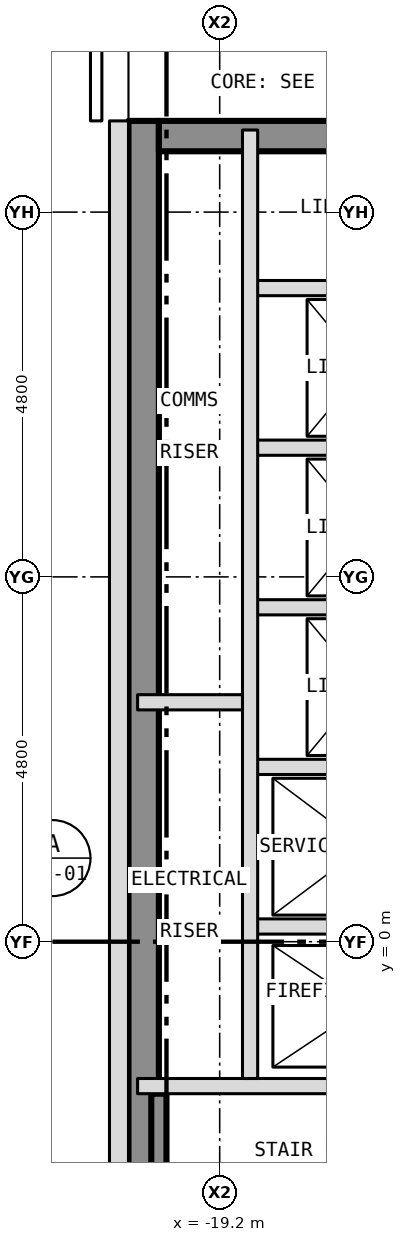
"""IFC4 building model, lengths in metres.
Left out: names, types, materials, properties, quantities, classifications, styles, units other than length and angle.
Written with IfcOpenShell. Run it as: python <this file> out.ifc"""

import sys

from ifc_helpers import new_model, si_unit, direction, frame, frame_2d, origin, place, context, subcontext, project, spatial, rectangle, extrude, element, save


model = new_model("IFC4")
c1 = context("Model", 3, precision=1e-05, world=origin(), true_north=direction((0.0, 1.0)))
c2 = subcontext(c1, "Body", "Model", "MODEL_VIEW")
j1 = project(units=[si_unit("LENGTHUNIT", "METRE"), si_unit("PLANEANGLEUNIT", "RADIAN")], contexts=[c1])
p1 = place(None, origin())
s1 = spatial("IfcSite", under=j1, at=p1, CompositionType="ELEMENT")
p2 = place(p1, origin())
s2 = spatial("IfcBuilding", under=s1, at=p2, CompositionType="ELEMENT")
p3 = place(p2, frame((0.0, 0.0, 233.0)))
s3 = spatial("IfcBuildingStorey", under=s2, at=p3, CompositionType="ELEMENT", Elevation=233.0)
p4 = place(p3, frame((-20.2, -10.8, 0.0), z_axis=(0.0, 0.0, 1.0), x_axis=(0.0, 1.0, 0.0)))
e1 = element("IfcWall", 1, at=p4, inside=s3, PredefinedType="SHEAR", context=c2, shape_type="SweptSolid", body=[
    extrude(rectangle(XDim=21.6, YDim=0.4, at=frame_2d((10.8, 0.0))), origin(), (0.0, 0.0, 1.0), 2.9),
])
p5 = place(p3, frame((-20.0, 10.6, 0.0), z_axis=(0.0, 0.0, 1.0), x_axis=(1.0, 0.0, 0.0)))
e2 = element("IfcWall", 2, at=p5, inside=s3, PredefinedType="SHEAR", context=c2, shape_type="SweptSolid", body=[
    extrude(rectangle(XDim=3.8, YDim=0.4, at=frame_2d((1.9, 0.0))), origin(), (0.0, 0.0, 1.0), 2.9),
])
p6 = place(p3, frame((-20.525, 10.8, 0.0), z_axis=(0.0, 0.0, 1.0), x_axis=(0.0, -1.0, 0.0)))
e3 = element("IfcWall", 3, at=p6, inside=s3, PredefinedType="SOLIDWALL", context=c2, shape_type="SweptSolid", body=[
    extrude(rectangle(XDim=21.6, YDim=0.25, at=frame_2d((10.8, 0.0))), origin(), (0.0, 0.0, 1.0), 3.5),
])
p7 = place(p6, frame((18.05, 0.0, 1.0)))
e4 = element("IfcOpeningElement", 4, at=p7, cuts=e3, PredefinedType="OPENING", context=c2, shape_type="SweptSolid", body=[
    extrude(rectangle(XDim=0.6, YDim=1.5, at=frame_2d((0.3, 0.75))), frame((0.0, 0.137, 0.0), z_axis=(0.0, -1.0, 0.0), x_axis=(1.0, 0.0, 0.0)), (0.0, 0.0, 1.0), 0.274),
])
p8 = place(p3, frame((-20.28, -1.9, 0.0), z_axis=(0.0, 0.0, 1.0), x_axis=(1.0, 0.0, 0.0)))
e5 = element("IfcWall", 5, at=p8, inside=s3, PredefinedType="PARTITIONING", context=c2, shape_type="SweptSolid", body=[
    extrude(rectangle(XDim=4.36, YDim=0.2, at=frame_2d((2.18, 0.0))), origin(), (0.0, 0.0, 1.0), 2.9),
])
for number, where, z_axis, x_axis in (
    (6, (-18.8, 0.2, 0.0), (0.0, 0.0, 1.0), (1.0, 0.0, 0.0)),
    (7, (-18.8, 2.3, 0.0), (0.0, 0.0, 1.0), (1.0, 0.0, 0.0)),
):
    element("IfcWall", number, at=place(p3, frame(where, z_axis=z_axis, x_axis=x_axis)), inside=s3, PredefinedType="PARTITIONING", context=c2, shape_type="SweptSolid", body=[
        extrude(rectangle(XDim=2.88, YDim=0.2, at=frame_2d((1.44, 0.0))), origin(), (0.0, 0.0, 1.0), 2.9),
    ])
p9 = place(p3, frame((-20.28, 3.15, 0.0), z_axis=(0.0, 0.0, 1.0), x_axis=(1.0, 0.0, 0.0)))
e8 = element("IfcWall", 8, at=p9, inside=s3, PredefinedType="PARTITIONING", context=c2, shape_type="SweptSolid", body=[
    extrude(rectangle(XDim=1.48, YDim=0.2, at=frame_2d((0.74, 0.0))), origin(), (0.0, 0.0, 1.0), 2.9),
])
for number, where, z_axis, x_axis in (
    (9, (-18.8, 4.4, 0.0), (0.0, 0.0, 1.0), (1.0, 0.0, 0.0)),
    (10, (-18.8, 6.5, 0.0), (0.0, 0.0, 1.0), (1.0, 0.0, 0.0)),
    (11, (-18.8, 8.6, 0.0), (0.0, 0.0, 1.0), (1.0, 0.0, 0.0)),
):
    element("IfcWall", number, at=place(p3, frame(where, z_axis=z_axis, x_axis=x_axis)), inside=s3, PredefinedType="PARTITIONING", context=c2, shape_type="SweptSolid", body=[
        extrude(rectangle(XDim=2.88, YDim=0.2, at=frame_2d((1.44, 0.0))), origin(), (0.0, 0.0, 1.0), 2.9),
    ])
p10 = place(p3, frame((-20.0, -10.68, 0.0), z_axis=(0.0, 0.0, 1.0), x_axis=(0.0, 1.0, 0.0)))
e12 = element("IfcWall", 12, at=p10, inside=s3, PredefinedType="SHEAR", context=c2, shape_type="SweptSolid", body=[
    extrude(rectangle(XDim=8.68, YDim=0.2, at=frame_2d((4.34, 0.0))), origin(), (0.0, 0.0, 1.0), 2.9),
])
p11 = place(p3, frame((-18.8, -1.8, 0.0), z_axis=(0.0, 0.0, 1.0), x_axis=(0.0, 1.0, 0.0)))
e13 = element("IfcWall", 13, at=p11, inside=s3, PredefinedType="PARTITIONING", context=c2, shape_type="SweptSolid", body=[
    extrude(rectangle(XDim=12.48, YDim=0.2, at=frame_2d((6.24, 0.0))), origin(), (0.0, 0.0, 1.0), 2.9),
])
save(model, sys.argv[1])
